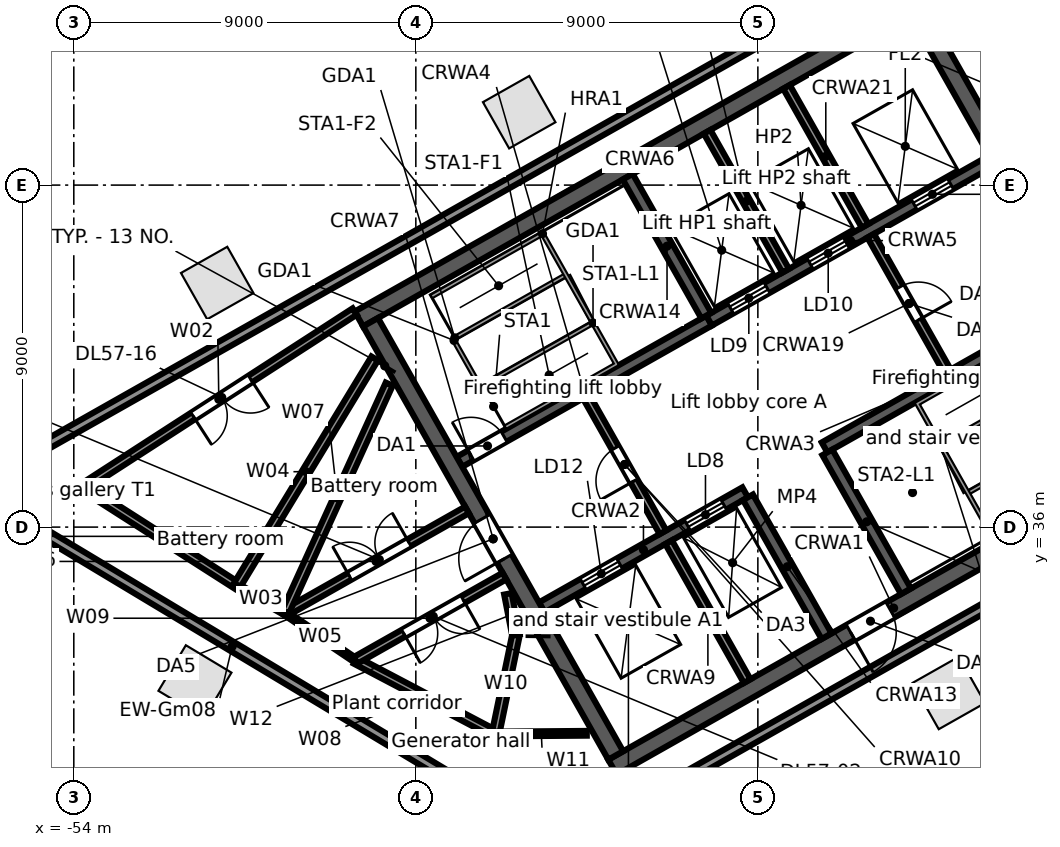
"""IFC4 building model, lengths in metres.
Left out: names, types, materials, properties, quantities, classifications, styles, units other than length and angle.
Written with IfcOpenShell. Run it as: python <this file> out.ifc"""

import sys

from ifc_helpers import new_model, si_unit, direction, frame, frame_2d, origin, origin_2d, place, context, subcontext, project, spatial, rectangle, extrude, element, fill, save


model = new_model("IFC4")
c1 = context("Model", 3, precision=1e-05, world=origin(), true_north=direction((0.0, 1.0)))
c2 = subcontext(c1, "Body", "Model", "MODEL_VIEW")
j1 = project(units=[si_unit("LENGTHUNIT", "METRE"), si_unit("PLANEANGLEUNIT", "RADIAN")], contexts=[c1])
p1 = place(None, origin())
s1 = spatial("IfcSite", under=j1, at=p1, CompositionType="ELEMENT")
p2 = place(p1, origin())
s2 = spatial("IfcBuilding", under=s1, at=p2, CompositionType="ELEMENT")
p3 = place(p2, frame((0.0, 0.0, 258.2)))
s3 = spatial("IfcBuildingStorey", under=s2, at=p3, CompositionType="ELEMENT", Elevation=258.2)
for number, where, z_axis, x_axis in (
    (1, (-42.28, 46.919, 0.0), (0.0, 0.0, 1.0), (-0.87, -0.492, 0.0)),
    (2, (-50.226, 42.423, 0.0), (0.0, 0.0, 1.0), (-0.87, -0.492, 0.0)),
    (3, (-50.812, 31.931, 0.0), (0.0, 0.0, 1.0), (0.857, -0.515, 0.0)),
    (4, (-30.976, 31.635, 0.0), (0.0, 0.0, 1.0), (0.87, 0.492, 0.0)),
):
    element("IfcColumn", number, at=place(p3, frame(where, z_axis=z_axis, x_axis=x_axis)), inside=s3, PredefinedType="COLUMN", context=c2, shape_type="SweptSolid", body=[
        extrude(rectangle(XDim=1.4, YDim=1.4, at=origin_2d()), origin(), (0.0, 0.0, 1.0), 4.5),
    ])
p4 = place(p3, frame((-0.364, 50.666, 0.0), z_axis=(0.0, 0.0, 1.0), x_axis=(-0.870355021882, -0.492424751494, 0.0)))
e5 = element("IfcWall", 5, at=p4, inside=s3, PredefinedType="STANDARD", context=c2, shape_type="SweptSolid", body=[
    extrude(rectangle(XDim=44.126, YDim=0.25, at=frame_2d((22.063, 0.0))), origin(), (0.0, 0.0, 1.0), 3.12),
])
p5 = place(p3, frame((-56.251, 37.302, 0.0), z_axis=(0.0, 0.0, 1.0), x_axis=(0.87035543516, 0.49242402103, 0.0)))
e6 = element("IfcWall", 6, at=p5, inside=s3, PredefinedType="STANDARD", context=c2, shape_type="SweptSolid", body=[
    extrude(rectangle(XDim=62.067, YDim=0.25, at=frame_2d((31.033, 0.0))), origin(), (0.0, 0.0, 1.0), 3.512),
])
p6 = place(p3, frame((-43.407, 28.998, 0.0), z_axis=(0.0, 0.0, 1.0), x_axis=(-0.857168059559, 0.515036811958, 0.0)))
e7 = element("IfcWall", 7, at=p6, inside=s3, PredefinedType="STANDARD", context=c2, shape_type="SweptSolid", body=[
    extrude(rectangle(XDim=14.994, YDim=0.25, at=frame_2d((7.497, 0.0))), origin(), (0.0, 0.0, 1.0), 3.52),
])
p7 = place(p3, frame((-39.825, 29.684, 0.0), z_axis=(0.0, 0.0, 1.0), x_axis=(0.870353598469, 0.492427267353, 0.0)))
e8 = element("IfcWall", 8, at=p7, inside=s3, PredefinedType="SOLIDWALL", context=c2, shape_type="SweptSolid", body=[
    extrude(rectangle(XDim=17.0, YDim=0.45, at=frame_2d((8.5, 0.0))), origin(), (0.0, 0.0, 1.0), 4.22),
])
p8 = place(p7, frame((7.2, 0.0, 0.0)))
e9 = element("IfcOpeningElement", 9, at=p8, cuts=e8, PredefinedType="OPENING", context=c2, shape_type="SweptSolid", body=[
    extrude(rectangle(XDim=1.2, YDim=2.1, at=frame_2d((0.6, 1.05))), frame((0.0, 0.235, 0.0), z_axis=(0.0, -1.0, 0.0), x_axis=(1.0, 0.0, 0.0)), (0.0, 0.0, 1.0), 0.47),
])
p9 = place(p3, frame((-41.687, 33.887, 0.0), z_axis=(0.0, 0.0, 1.0), x_axis=(0.870355736587, 0.49242348826, 0.0)))
e10 = element("IfcWall", 10, at=p9, inside=s3, PredefinedType="SOLIDWALL", context=c2, shape_type="SweptSolid", body=[
    extrude(rectangle(XDim=6.15, YDim=0.3, at=frame_2d((3.075, 0.0))), origin(), (0.0, 0.0, 1.0), 4.22),
])
p10 = place(p9, frame((1.25, 0.0, 0.0)))
e11 = element("IfcOpeningElement", 11, at=p10, cuts=e10, PredefinedType="OPENING", context=c2, shape_type="SweptSolid", body=[
    extrude(rectangle(XDim=1.1, YDim=2.1, at=frame_2d((0.55, 1.05))), frame((0.0, 0.16, 0.0), z_axis=(0.0, -1.0, 0.0), x_axis=(1.0, 0.0, 0.0)), (0.0, 0.0, 1.0), 0.32),
])
p11 = place(p9, frame((4.4, 0.0, 0.0)))
e12 = element("IfcOpeningElement", 12, at=p11, cuts=e10, PredefinedType="OPENING", context=c2, shape_type="SweptSolid", body=[
    extrude(rectangle(XDim=1.1, YDim=2.1, at=frame_2d((0.55, 1.05))), frame((0.0, 0.16, 0.0), z_axis=(0.0, -1.0, 0.0), x_axis=(1.0, 0.0, 0.0)), (0.0, 0.0, 1.0), 0.32),
])
p12 = place(p3, frame((-34.245, 38.097, 0.0), z_axis=(0.0, 0.0, 1.0), x_axis=(0.870360409231, 0.492415229297, 0.0)))
e13 = element("IfcWall", 13, at=p12, inside=s3, PredefinedType="SOLIDWALL", context=c2, shape_type="SweptSolid", body=[
    extrude(rectangle(XDim=7.55, YDim=0.3, at=frame_2d((3.775, 0.0))), origin(), (0.0, 0.0, 1.0), 4.22),
])
p13 = place(p12, frame((6.2, 0.0, 0.0)))
e14 = element("IfcOpeningElement", 14, at=p13, cuts=e13, PredefinedType="OPENING", context=c2, shape_type="SweptSolid", body=[
    extrude(rectangle(XDim=1.0, YDim=2.1, at=frame_2d((0.5, 1.05))), frame((0.0, 0.16, 0.0), z_axis=(0.0, -1.0, 0.0), x_axis=(1.0, 0.0, 0.0)), (0.0, 0.0, 1.0), 0.32),
])
p14 = place(p3, frame((-43.853, 37.717, 0.0), z_axis=(0.0, 0.0, 1.0), x_axis=(0.870360409231, 0.492415229297, 0.0)))
e15 = element("IfcWall", 15, at=p14, inside=s3, PredefinedType="SOLIDWALL", context=c2, shape_type="SweptSolid", body=[
    extrude(rectangle(XDim=7.55, YDim=0.3, at=frame_2d((3.775, 0.0))), origin(), (0.0, 0.0, 1.0), 4.22),
])
p15 = place(p14, frame((0.35, 0.0, 0.0)))
e16 = element("IfcOpeningElement", 16, at=p15, cuts=e15, PredefinedType="OPENING", context=c2, shape_type="SweptSolid", body=[
    extrude(rectangle(XDim=1.0, YDim=2.1, at=frame_2d((0.5, 1.05))), frame((0.0, 0.16, 0.0), z_axis=(0.0, -1.0, 0.0), x_axis=(1.0, 0.0, 0.0)), (0.0, 0.0, 1.0), 0.32),
])
p16 = place(p3, frame((-37.282, 41.435, 0.0), z_axis=(0.0, 0.0, 1.0), x_axis=(0.870352688754, 0.492428875248, 0.0)))
e17 = element("IfcWall", 17, at=p16, inside=s3, PredefinedType="SOLIDWALL", context=c2, shape_type="SweptSolid", body=[
    extrude(rectangle(XDim=8.55, YDim=0.3, at=frame_2d((4.275, 0.0))), origin(), (0.0, 0.0, 1.0), 4.22),
])
p17 = place(p16, frame((0.65, 0.0, 0.0)))
e18 = element("IfcOpeningElement", 18, at=p17, cuts=e17, PredefinedType="OPENING", context=c2, shape_type="SweptSolid", body=[
    extrude(rectangle(XDim=1.1, YDim=2.1, at=frame_2d((0.55, 1.05))), frame((0.0, 0.16, 0.0), z_axis=(0.0, -1.0, 0.0), x_axis=(1.0, 0.0, 0.0)), (0.0, 0.0, 1.0), 0.32),
])
p18 = place(p16, frame((3.05, 0.0, 0.0)))
e19 = element("IfcOpeningElement", 19, at=p18, cuts=e17, PredefinedType="OPENING", context=c2, shape_type="SweptSolid", body=[
    extrude(rectangle(XDim=1.1, YDim=2.1, at=frame_2d((0.55, 1.05))), frame((0.0, 0.16, 0.0), z_axis=(0.0, -1.0, 0.0), x_axis=(1.0, 0.0, 0.0)), (0.0, 0.0, 1.0), 0.32),
])
p19 = place(p16, frame((6.2, 0.0, 0.0)))
e20 = element("IfcOpeningElement", 20, at=p19, cuts=e17, PredefinedType="OPENING", context=c2, shape_type="SweptSolid", body=[
    extrude(rectangle(XDim=1.1, YDim=2.1, at=frame_2d((0.55, 1.05))), frame((0.0, 0.16, 0.0), z_axis=(0.0, -1.0, 0.0), x_axis=(1.0, 0.0, 0.0)), (0.0, 0.0, 1.0), 0.32),
])
p20 = place(p3, frame((-46.498, 41.477, 0.0), z_axis=(0.0, 0.0, 1.0), x_axis=(0.870359753402, 0.492416388494, 0.0)))
e21 = element("IfcWall", 21, at=p20, inside=s3, PredefinedType="SOLIDWALL", context=c2, shape_type="SweptSolid", body=[
    extrude(rectangle(XDim=17.0, YDim=0.45, at=frame_2d((8.5, 0.0))), origin(), (0.0, 0.0, 1.0), 4.22),
])
p21 = place(p3, frame((-46.191, 41.392, 0.0), z_axis=(0.0, 0.0, 1.0), x_axis=(0.492421378713, -0.870356930107, 0.0)))
e22 = element("IfcWall", 22, at=p21, inside=s3, PredefinedType="SOLIDWALL", context=c2, shape_type="SweptSolid", body=[
    extrude(rectangle(XDim=13.1, YDim=0.45, at=frame_2d((6.55, 0.0))), origin(), (0.0, 0.0, 1.0), 4.22),
])
p22 = place(p21, frame((5.95, 0.0, 0.0)))
e23 = element("IfcOpeningElement", 23, at=p22, cuts=e22, PredefinedType="OPENING", context=c2, shape_type="SweptSolid", body=[
    extrude(rectangle(XDim=1.2, YDim=2.1, at=frame_2d((0.6, 1.05))), frame((0.0, 0.235, 0.0), z_axis=(0.0, -1.0, 0.0), x_axis=(1.0, 0.0, 0.0)), (0.0, 0.0, 1.0), 0.47),
])
p23 = place(p3, frame((-38.349, 35.603, 0.0), z_axis=(0.0, 0.0, 1.0), x_axis=(0.492409653846, -0.870363563575, 0.0)))
e24 = element("IfcWall", 24, at=p23, inside=s3, PredefinedType="SOLIDWALL", context=c2, shape_type="SweptSolid", body=[
    extrude(rectangle(XDim=4.2, YDim=0.2, at=frame_2d((2.1, 0.0))), origin(), (0.0, 0.0, 1.0), 4.22),
])
p24 = place(p3, frame((-40.516, 39.433, 0.0), z_axis=(0.0, 0.0, 1.0), x_axis=(0.492453559952, -0.87033872216, 0.0)))
e25 = element("IfcWall", 25, at=p24, inside=s3, PredefinedType="PARTITIONING", context=c2, shape_type="SweptSolid", body=[
    extrude(rectangle(XDim=4.1, YDim=0.2, at=frame_2d((2.05, 0.0))), origin(), (0.0, 0.0, 1.0), 4.22),
])
p25 = place(p24, frame((1.55, 0.0, 0.0)))
e26 = element("IfcOpeningElement", 26, at=p25, cuts=e25, PredefinedType="OPENING", context=c2, shape_type="SweptSolid", body=[
    extrude(rectangle(XDim=1.0, YDim=2.1, at=frame_2d((0.5, 1.05))), frame((0.0, 0.11, 0.0), z_axis=(0.0, -1.0, 0.0), x_axis=(1.0, 0.0, 0.0)), (0.0, 0.0, 1.0), 0.22),
])
for number, where, z_axis, x_axis in (
    (27, (-36.26, 36.785, 0.0), (0.0, 0.0, 1.0), (0.492, -0.87, 0.0)),
    (28, (-39.424, 45.22, 0.0), (0.0, 0.0, 1.0), (0.492, -0.87, 0.0)),
    (29, (-34.171, 37.967, 0.0), (0.0, 0.0, 1.0), (0.492, -0.87, 0.0)),
):
    element("IfcWall", number, at=place(p3, frame(where, z_axis=z_axis, x_axis=x_axis)), inside=s3, PredefinedType="SOLIDWALL", context=c2, shape_type="SweptSolid", body=[
        extrude(rectangle(XDim=4.2, YDim=0.3, at=frame_2d((2.1, 0.0))), origin(), (0.0, 0.0, 1.0), 4.22),
    ])
p26 = place(p3, frame((-37.335, 46.402, 0.0), z_axis=(0.0, 0.0, 1.0), x_axis=(0.492409653846, -0.870363563575, 0.0)))
e30 = element("IfcWall", 30, at=p26, inside=s3, PredefinedType="SOLIDWALL", context=c2, shape_type="SweptSolid", body=[
    extrude(rectangle(XDim=4.2, YDim=0.2, at=frame_2d((2.1, 0.0))), origin(), (0.0, 0.0, 1.0), 4.22),
])
p27 = place(p3, frame((-33.031, 43.667, 0.0), z_axis=(0.0, 0.0, 1.0), x_axis=(0.492408451753, -0.87036424366, 0.0)))
e31 = element("IfcWall", 31, at=p27, inside=s3, PredefinedType="PARTITIONING", context=c2, shape_type="SweptSolid", body=[
    extrude(rectangle(XDim=4.1, YDim=0.2, at=frame_2d((2.05, 0.0))), origin(), (0.0, 0.0, 1.0), 4.22),
])
p28 = place(p27, frame((1.55, 0.0, 0.0)))
e32 = element("IfcOpeningElement", 32, at=p28, cuts=e31, PredefinedType="OPENING", context=c2, shape_type="SweptSolid", body=[
    extrude(rectangle(XDim=1.0, YDim=2.1, at=frame_2d((0.5, 1.05))), frame((0.0, 0.11, 0.0), z_axis=(0.0, -1.0, 0.0), x_axis=(1.0, 0.0, 0.0)), (0.0, 0.0, 1.0), 0.22),
])
p29 = place(p3, frame((-35.246, 47.584, 0.0), z_axis=(0.0, 0.0, 1.0), x_axis=(0.492409653846, -0.870363563575, 0.0)))
e33 = element("IfcWall", 33, at=p29, inside=s3, PredefinedType="SOLIDWALL", context=c2, shape_type="SweptSolid", body=[
    extrude(rectangle(XDim=4.2, YDim=0.2, at=frame_2d((2.1, 0.0))), origin(), (0.0, 0.0, 1.0), 4.22),
])
p30 = place(p3, frame((-31.787, 49.542, 0.0), z_axis=(0.0, 0.0, 1.0), x_axis=(0.492421378713, -0.870356930107, 0.0)))
e34 = element("IfcWall", 34, at=p30, inside=s3, PredefinedType="SOLIDWALL", context=c2, shape_type="SweptSolid", body=[
    extrude(rectangle(XDim=13.1, YDim=0.45, at=frame_2d((6.55, 0.0))), origin(), (0.0, 0.0, 1.0), 4.22),
])
p31 = place(p30, frame((5.95, 0.0, 0.0)))
e35 = element("IfcOpeningElement", 35, at=p31, cuts=e34, PredefinedType="OPENING", context=c2, shape_type="SweptSolid", body=[
    extrude(rectangle(XDim=1.2, YDim=2.1, at=frame_2d((0.6, 1.05))), frame((0.0, 0.235, 0.0), z_axis=(0.0, -1.0, 0.0), x_axis=(1.0, 0.0, 0.0)), (0.0, 0.0, 1.0), 0.47),
])
p32 = place(p3, frame((-53.76, 37.052, 0.0), z_axis=(0.0, 0.0, 1.0), x_axis=(0.842421660073, -0.538818843992, 0.0)))
e36 = element("IfcWall", 36, at=p32, inside=s3, PredefinedType="PARTITIONING", context=c2, shape_type="SweptSolid", body=[
    extrude(rectangle(XDim=4.809, YDim=0.2, at=frame_2d((2.404, 0.0))), origin(), (0.0, 0.0, 1.0), 4.22),
])
p33 = place(p3, frame((-53.76, 37.052, 0.0), z_axis=(0.0, 0.0, 1.0), x_axis=(0.83989696129, 0.542745883831, 0.0)))
e37 = element("IfcWall", 37, at=p33, inside=s3, PredefinedType="PARTITIONING", context=c2, shape_type="SweptSolid", body=[
    extrude(rectangle(XDim=8.514, YDim=0.2, at=frame_2d((4.257, 0.0))), origin(), (0.0, 0.0, 1.0), 4.22),
])
p34 = place(p33, frame((3.45, 0.0, 0.0)))
e38 = element("IfcOpeningElement", 38, at=p34, cuts=e37, PredefinedType="OPENING", context=c2, shape_type="SweptSolid", body=[
    extrude(rectangle(XDim=1.8, YDim=2.1, at=frame_2d((0.9, 1.05))), frame((0.0, 0.11, 0.0), z_axis=(0.0, -1.0, 0.0), x_axis=(1.0, 0.0, 0.0)), (0.0, 0.0, 1.0), 0.22),
])
p35 = place(p3, frame((-49.701, 34.456, 0.0), z_axis=(0.0, 0.0, 1.0), x_axis=(0.869993053358, -0.493063978718, 0.0)))
e39 = element("IfcWall", 39, at=p35, inside=s3, PredefinedType="PARTITIONING", context=c2, shape_type="SweptSolid", body=[
    extrude(rectangle(XDim=1.438, YDim=0.125, at=frame_2d((0.719, 0.0))), origin(), (0.0, 0.0, 1.0), 3.971),
])
p36 = place(p3, frame((-49.699, 34.478, 0.0), z_axis=(0.0, 0.0, 1.0), x_axis=(0.51880997965, 0.854889586447, 0.0)))
e40 = element("IfcWall", 40, at=p36, inside=s3, PredefinedType="PARTITIONING", context=c2, shape_type="SweptSolid", body=[
    extrude(rectangle(XDim=6.972, YDim=0.2, at=frame_2d((3.486, 0.0))), origin(), (0.0, 0.0, 1.0), 4.22),
])
p37 = place(p3, frame((-48.441, 33.742, 0.0), z_axis=(0.0, 0.0, 1.0), x_axis=(0.829690845398, -0.558223164211, 0.0)))
e41 = element("IfcWall", 41, at=p37, inside=s3, PredefinedType="PARTITIONING", context=c2, shape_type="SweptSolid", body=[
    extrude(rectangle(XDim=2.236, YDim=0.125, at=frame_2d((1.118, 0.0))), origin(), (0.0, 0.0, 1.0), 3.5),
])
p38 = place(p3, frame((-48.441, 33.742, 0.0), z_axis=(0.0, 0.0, 1.0), x_axis=(0.870300652468, 0.492520836425, 0.0)))
e42 = element("IfcWall", 42, at=p38, inside=s3, PredefinedType="PARTITIONING", context=c2, shape_type="SweptSolid", body=[
    extrude(rectangle(XDim=5.5, YDim=0.2, at=frame_2d((2.75, 0.0))), origin(), (0.0, 0.0, 1.0), 4.22),
])
p39 = place(p38, frame((1.95, 0.0, 0.0)))
e43 = element("IfcOpeningElement", 43, at=p39, cuts=e42, PredefinedType="OPENING", context=c2, shape_type="SweptSolid", body=[
    extrude(rectangle(XDim=1.8, YDim=2.1, at=frame_2d((0.9, 1.05))), frame((0.0, 0.11, 0.0), z_axis=(0.0, -1.0, 0.0), x_axis=(1.0, 0.0, 0.0)), (0.0, 0.0, 1.0), 0.22),
])
p40 = place(p3, frame((-48.43, 33.767, 0.0), z_axis=(0.0, 0.0, 1.0), x_axis=(0.414258021322, 0.910159486997, 0.0)))
e44 = element("IfcWall", 44, at=p40, inside=s3, PredefinedType="PARTITIONING", context=c2, shape_type="SweptSolid", body=[
    extrude(rectangle(XDim=6.588, YDim=0.2, at=frame_2d((3.294, 0.0))), origin(), (0.0, 0.0, 1.0), 4.22),
])
p41 = place(p3, frame((-46.586, 32.494, 0.0), z_axis=(0.0, 0.0, 1.0), x_axis=(0.884902948151, -0.465775452717, 0.0)))
e45 = element("IfcWall", 45, at=p41, inside=s3, PredefinedType="PARTITIONING", context=c2, shape_type="SweptSolid", body=[
    extrude(rectangle(XDim=4.161, YDim=0.2, at=frame_2d((2.081, 0.0))), origin(), (0.0, 0.0, 1.0), 4.22),
])
p42 = place(p3, frame((-46.586, 32.494, 0.0), z_axis=(0.0, 0.0, 1.0), x_axis=(0.87036170491, 0.492412939134, 0.0)))
e46 = element("IfcWall", 46, at=p42, inside=s3, PredefinedType="PARTITIONING", context=c2, shape_type="SweptSolid", body=[
    extrude(rectangle(XDim=4.5, YDim=0.2, at=frame_2d((2.25, 0.0))), origin(), (0.0, 0.0, 1.0), 4.22),
])
p43 = place(p42, frame((1.45, 0.0, 0.0)))
e47 = element("IfcOpeningElement", 47, at=p43, cuts=e46, PredefinedType="OPENING", context=c2, shape_type="SweptSolid", body=[
    extrude(rectangle(XDim=1.8, YDim=2.1, at=frame_2d((0.9, 1.05))), frame((0.0, 0.11, 0.0), z_axis=(0.0, -1.0, 0.0), x_axis=(1.0, 0.0, 0.0)), (0.0, 0.0, 1.0), 0.22),
])
p44 = place(p3, frame((-42.9, 30.576, 0.0), z_axis=(0.0, 0.0, 1.0), x_axis=(0.202504561786, 0.979281319364, 0.0)))
e48 = element("IfcWall", 48, at=p44, inside=s3, PredefinedType="PARTITIONING", context=c2, shape_type="SweptSolid", body=[
    extrude(rectangle(XDim=2.637, YDim=0.2, at=frame_2d((1.318, 0.0))), origin(), (0.0, 0.0, 1.0), 4.22),
])
p45 = place(p3, frame((-42.894, 30.556, 0.0), z_axis=(0.0, 0.0, 1.0), x_axis=(0.999971480626, 0.007552346353, 0.0)))
e49 = element("IfcWall", 49, at=p45, inside=s3, PredefinedType="PARTITIONING", context=c2, shape_type="SweptSolid", body=[
    extrude(rectangle(XDim=2.392, YDim=0.125, at=frame_2d((1.196, 0.0))), origin(), (0.0, 0.0, 1.0), 3.971),
])
p46 = place(p3, frame((-42.578, 34.244, 0.0), z_axis=(0.0, 0.0, 1.0), x_axis=(0.19153109743, -0.981486545357, 0.0)))
e50 = element("IfcWall", 50, at=p46, inside=s3, PredefinedType="PARTITIONING", context=c2, shape_type="SweptSolid", body=[
    extrude(rectangle(XDim=1.106, YDim=0.2, at=frame_2d((0.553, 0.0))), origin(), (0.0, 0.0, 1.0), 4.22),
])
p47 = place(p17, origin())
e51 = element("IfcDoor", 51, at=p47, inside=s3, OperationType="DOUBLE_DOOR_SLIDING", PredefinedType="DOOR", context=c2, shape_type="SweptSolid", body=[
    extrude(rectangle(XDim=1.1, YDim=2.1, at=frame_2d((0.55, 1.05))), frame((0.0, 0.025, 0.0), z_axis=(0.0, -1.0, 0.0), x_axis=(1.0, 0.0, 0.0)), (0.0, 0.0, 1.0), 0.05),
])
fill(e18, e51)
p48 = place(p18, origin())
e52 = element("IfcDoor", 52, at=p48, inside=s3, OperationType="DOUBLE_DOOR_SLIDING", PredefinedType="DOOR", context=c2, shape_type="SweptSolid", body=[
    extrude(rectangle(XDim=1.1, YDim=2.1, at=frame_2d((0.55, 1.05))), frame((0.0, 0.025, 0.0), z_axis=(0.0, -1.0, 0.0), x_axis=(1.0, 0.0, 0.0)), (0.0, 0.0, 1.0), 0.05),
])
fill(e19, e52)
p49 = place(p19, origin())
e53 = element("IfcDoor", 53, at=p49, inside=s3, OperationType="DOUBLE_DOOR_SLIDING", PredefinedType="DOOR", context=c2, shape_type="SweptSolid", body=[
    extrude(rectangle(XDim=1.1, YDim=2.1, at=frame_2d((0.55, 1.05))), frame((0.0, 0.025, 0.0), z_axis=(0.0, -1.0, 0.0), x_axis=(1.0, 0.0, 0.0)), (0.0, 0.0, 1.0), 0.05),
])
fill(e20, e53)
p50 = place(p10, origin())
e54 = element("IfcDoor", 54, at=p50, inside=s3, OperationType="DOUBLE_DOOR_SLIDING", PredefinedType="DOOR", context=c2, shape_type="SweptSolid", body=[
    extrude(rectangle(XDim=1.1, YDim=2.1, at=frame_2d((0.55, 1.05))), frame((0.0, 0.025, 0.0), z_axis=(0.0, -1.0, 0.0), x_axis=(1.0, 0.0, 0.0)), (0.0, 0.0, 1.0), 0.05),
])
fill(e11, e54)
p51 = place(p11, origin())
e55 = element("IfcDoor", 55, at=p51, inside=s3, OperationType="DOUBLE_DOOR_SLIDING", PredefinedType="DOOR", context=c2, shape_type="SweptSolid", body=[
    extrude(rectangle(XDim=1.1, YDim=2.1, at=frame_2d((0.55, 1.05))), frame((0.0, 0.025, 0.0), z_axis=(0.0, -1.0, 0.0), x_axis=(1.0, 0.0, 0.0)), (0.0, 0.0, 1.0), 0.05),
])
fill(e12, e55)
p52 = place(p15, origin())
e56 = element("IfcDoor", 56, at=p52, inside=s3, OperationType="SINGLE_SWING_LEFT", PredefinedType="DOOR", context=c2, shape_type="SweptSolid", body=[
    extrude(rectangle(XDim=1.0, YDim=2.1, at=frame_2d((0.5, 1.05))), frame((0.0, 0.025, 0.0), z_axis=(0.0, -1.0, 0.0), x_axis=(1.0, 0.0, 0.0)), (0.0, 0.0, 1.0), 0.05),
])
fill(e16, e56)
p53 = place(p25, frame((1.0, 0.0, 0.0), z_axis=(0.0, 0.0, 1.0), x_axis=(-1.0, 0.0, 0.0)))
e57 = element("IfcDoor", 57, at=p53, inside=s3, OperationType="SINGLE_SWING_LEFT", PredefinedType="DOOR", context=c2, shape_type="SweptSolid", body=[
    extrude(rectangle(XDim=1.0, YDim=2.1, at=frame_2d((0.5, 1.05))), frame((0.0, 0.025, 0.0), z_axis=(0.0, -1.0, 0.0), x_axis=(1.0, 0.0, 0.0)), (0.0, 0.0, 1.0), 0.05),
])
fill(e26, e57)
p54 = place(p22, frame((1.2, 0.0, 0.0), z_axis=(0.0, 0.0, 1.0), x_axis=(-1.0, 0.0, 0.0)))
e58 = element("IfcDoor", 58, at=p54, inside=s3, OperationType="SINGLE_SWING_LEFT", PredefinedType="DOOR", context=c2, shape_type="SweptSolid", body=[
    extrude(rectangle(XDim=1.2, YDim=2.1, at=frame_2d((0.6, 1.05))), frame((0.0, 0.025, 0.0), z_axis=(0.0, -1.0, 0.0), x_axis=(1.0, 0.0, 0.0)), (0.0, 0.0, 1.0), 0.05),
])
fill(e23, e58)
p55 = place(p28, origin())
e59 = element("IfcDoor", 59, at=p55, inside=s3, OperationType="SINGLE_SWING_RIGHT", PredefinedType="DOOR", context=c2, shape_type="SweptSolid", body=[
    extrude(rectangle(XDim=1.0, YDim=2.1, at=frame_2d((0.5, 1.05))), frame((0.0, 0.025, 0.0), z_axis=(0.0, -1.0, 0.0), x_axis=(1.0, 0.0, 0.0)), (0.0, 0.0, 1.0), 0.05),
])
fill(e32, e59)
p56 = place(p8, frame((1.2, 0.0, 0.0), z_axis=(0.0, 0.0, 1.0), x_axis=(-1.0, 0.0, 0.0)))
e60 = element("IfcDoor", 60, at=p56, inside=s3, OperationType="SINGLE_SWING_RIGHT", PredefinedType="DOOR", context=c2, shape_type="SweptSolid", body=[
    extrude(rectangle(XDim=1.2, YDim=2.1, at=frame_2d((0.6, 1.05))), frame((0.0, 0.025, 0.0), z_axis=(0.0, -1.0, 0.0), x_axis=(1.0, 0.0, 0.0)), (0.0, 0.0, 1.0), 0.05),
])
fill(e9, e60)
p57 = place(p39, origin())
e61 = element("IfcDoor", 61, at=p57, inside=s3, OperationType="DOUBLE_DOOR_SINGLE_SWING", PredefinedType="DOOR", context=c2, shape_type="SweptSolid", body=[
    extrude(rectangle(XDim=1.8, YDim=2.1, at=frame_2d((0.9, 1.05))), frame((0.0, 0.025, 0.0), z_axis=(0.0, -1.0, 0.0), x_axis=(1.0, 0.0, 0.0)), (0.0, 0.0, 1.0), 0.05),
])
fill(e43, e61)
p58 = place(p43, frame((1.8, 0.0, 0.0), z_axis=(0.0, 0.0, 1.0), x_axis=(-1.0, 0.0, 0.0)))
e62 = element("IfcDoor", 62, at=p58, inside=s3, OperationType="DOUBLE_DOOR_SINGLE_SWING", PredefinedType="DOOR", context=c2, shape_type="SweptSolid", body=[
    extrude(rectangle(XDim=1.8, YDim=2.1, at=frame_2d((0.9, 1.05))), frame((0.0, 0.025, 0.0), z_axis=(0.0, -1.0, 0.0), x_axis=(1.0, 0.0, 0.0)), (0.0, 0.0, 1.0), 0.05),
])
fill(e47, e62)
p59 = place(p34, frame((1.8, 0.0, 0.0), z_axis=(0.0, 0.0, 1.0), x_axis=(-1.0, 0.0, 0.0)))
e63 = element("IfcDoor", 63, at=p59, inside=s3, OperationType="DOUBLE_DOOR_SINGLE_SWING", PredefinedType="DOOR", context=c2, shape_type="SweptSolid", body=[
    extrude(rectangle(XDim=1.8, YDim=2.1, at=frame_2d((0.9, 1.05))), frame((0.0, 0.025, 0.0), z_axis=(0.0, -1.0, 0.0), x_axis=(1.0, 0.0, 0.0)), (0.0, 0.0, 1.0), 0.05),
])
fill(e38, e63)
save(model, sys.argv[1])
